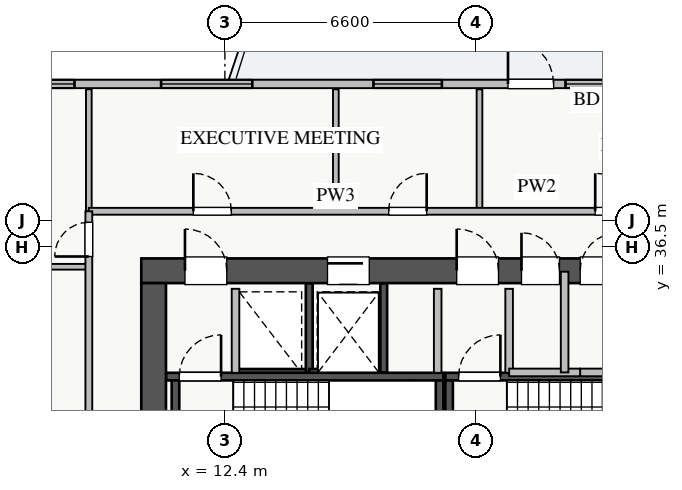
"""IFC4 building model, lengths in metres.
Left out: names, types, materials, properties, quantities, classifications, styles, units other than length and angle.
Written with IfcOpenShell. Run it as: python <this file> out.ifc"""

import sys

from ifc_helpers import new_model, si_unit, direction, frame, frame_2d, origin, place, context, subcontext, project, spatial, rectangle, extrude, source, transform, mapped, element, fill, save


model = new_model("IFC4")
c1 = context("Model", 3, precision=1e-05, world=origin(), true_north=direction((0.0, 1.0)))
c2 = subcontext(c1, "Body", "Model", "MODEL_VIEW")
j1 = project(units=[si_unit("LENGTHUNIT", "METRE"), si_unit("PLANEANGLEUNIT", "RADIAN")], contexts=[c1])
p1 = place(None, origin())
s1 = spatial("IfcSite", under=j1, at=p1, CompositionType="ELEMENT")
p2 = place(p1, origin())
s2 = spatial("IfcBuilding", under=s1, at=p2, CompositionType="ELEMENT")
p3 = place(p2, frame((0.0, 0.0, 103.5)))
s3 = spatial("IfcBuildingStorey", under=s2, at=p3, CompositionType="ELEMENT", Elevation=103.5)
p4 = place(p3, frame((12.68, 33.2, 0.0), z_axis=(0.0, 0.0, 1.0), x_axis=(1.0, 0.0, 0.0)))
e1 = element("IfcWall", 1, at=p4, inside=s3, PredefinedType="SHEAR", context=c2, shape_type="SweptSolid", body=[
    extrude(rectangle(XDim=1.94, YDim=0.18, at=frame_2d((0.97, 0.0))), origin(), (0.0, 0.0, 1.0), 3.07),
])
p5 = place(p3, frame((14.62, 33.2, 0.0), z_axis=(0.0, 0.0, 1.0), x_axis=(0.0, 1.0, 0.0)))
e2 = element("IfcWall", 2, at=p5, inside=s3, PredefinedType="SHEAR", context=c2, shape_type="SweptSolid", body=[
    extrude(rectangle(XDim=2.35, YDim=0.18, at=frame_2d((1.175, 0.0))), origin(), (0.0, 0.0, 1.0), 3.07),
])
p6 = place(p3, frame((14.62, 33.2, 0.0), z_axis=(0.0, 0.0, 1.0), x_axis=(1.0, 0.0, 0.0)))
e3 = element("IfcWall", 3, at=p6, inside=s3, PredefinedType="SHEAR", context=c2, shape_type="SweptSolid", body=[
    extrude(rectangle(XDim=1.96, YDim=0.18, at=frame_2d((0.98, 0.0))), origin(), (0.0, 0.0, 1.0), 3.07),
])
p7 = place(p3, frame((16.58, 33.2, 0.0), z_axis=(0.0, 0.0, 1.0), x_axis=(0.0, 1.0, 0.0)))
e4 = element("IfcWall", 4, at=p7, inside=s3, PredefinedType="SHEAR", context=c2, shape_type="SweptSolid", body=[
    extrude(rectangle(XDim=2.35, YDim=0.18, at=frame_2d((1.175, 0.0))), origin(), (0.0, 0.0, 1.0), 3.07),
])
p8 = place(p3, frame((10.85, 33.09, 0.0), z_axis=(0.0, 0.0, 1.0), x_axis=(1.0, 0.0, 0.0)))
e5 = element("IfcWall", 5, at=p8, inside=s3, PredefinedType="SHEAR", context=c2, shape_type="SweptSolid", body=[
    extrude(rectangle(XDim=7.3, YDim=0.2, at=frame_2d((3.65, 0.0))), origin(), (0.0, 0.0, 1.0), 3.25),
])
p9 = place(p8, frame((0.35, 0.0, 0.0)))
e6 = element("IfcOpeningElement", 6, at=p9, cuts=e5, PredefinedType="OPENING", context=c2, shape_type="SweptSolid", body=[
    extrude(rectangle(XDim=1.1, YDim=2.05, at=frame_2d((0.55, 1.025))), frame((0.0, 0.11, 0.0), z_axis=(0.0, -1.0, 0.0), x_axis=(1.0, 0.0, 0.0)), (0.0, 0.0, 1.0), 0.22),
])
for number, where, z_axis, x_axis in (
    (7, (11.1, 30.05, 0.0), (0.0, 0.0, 1.0), (0.0, 1.0, 0.0)),
    (8, (18.05, 30.05, 0.0), (0.0, 0.0, 1.0), (0.0, 1.0, 0.0)),
):
    element("IfcWall", number, at=place(p3, frame(where, z_axis=z_axis, x_axis=x_axis)), inside=s3, PredefinedType="SHEAR", context=c2, shape_type="SweptSolid", body=[
        extrude(rectangle(XDim=2.94, YDim=0.2, at=frame_2d((1.47, 0.0))), origin(), (0.0, 0.0, 1.0), 3.25),
    ])
p10 = place(p3, frame((18.2, 33.09, 0.0), z_axis=(0.0, 0.0, 1.0), x_axis=(1.0, 0.0, 0.0)))
e9 = element("IfcWall", 9, at=p10, inside=s3, PredefinedType="SHEAR", context=c2, shape_type="SweptSolid", body=[
    extrude(rectangle(XDim=7.15, YDim=0.2, at=frame_2d((3.575, 0.0))), origin(), (0.0, 0.0, 1.0), 3.25),
])
p11 = place(p10, frame((0.35, 0.0, 0.0)))
e10 = element("IfcOpeningElement", 10, at=p11, cuts=e9, PredefinedType="OPENING", context=c2, shape_type="SweptSolid", body=[
    extrude(rectangle(XDim=1.1, YDim=2.05, at=frame_2d((0.55, 1.025))), frame((0.0, 0.11, 0.0), z_axis=(0.0, -1.0, 0.0), x_axis=(1.0, 0.0, 0.0)), (0.0, 0.0, 1.0), 0.22),
])
p12 = place(p3, frame((18.3, 30.05, 0.0), z_axis=(0.0, 0.0, 1.0), x_axis=(0.0, 1.0, 0.0)))
e11 = element("IfcWall", 11, at=p12, inside=s3, PredefinedType="SHEAR", context=c2, shape_type="SweptSolid", body=[
    extrude(rectangle(XDim=2.94, YDim=0.2, at=frame_2d((1.47, 0.0))), origin(), (0.0, 0.0, 1.0), 3.25),
])
p13 = place(p3, frame((10.2, 35.875, 0.0), z_axis=(0.0, 0.0, 1.0), x_axis=(1.0, 0.0, 0.0)))
e12 = element("IfcWall", 12, at=p13, inside=s3, PredefinedType="SHEAR", context=c2, shape_type="SweptSolid", body=[
    extrude(rectangle(XDim=17.6, YDim=0.65, at=frame_2d((8.8, 0.0))), origin(), (0.0, 0.0, 1.0), 3.25),
])
p14 = place(p13, frame((1.15, 0.0, 0.0)))
e13 = element("IfcOpeningElement", 13, at=p14, cuts=e12, PredefinedType="OPENING", context=c2, shape_type="SweptSolid", body=[
    extrude(rectangle(XDim=1.1, YDim=2.05, at=frame_2d((0.55, 1.025))), frame((0.0, 0.335, 0.0), z_axis=(0.0, -1.0, 0.0), x_axis=(1.0, 0.0, 0.0)), (0.0, 0.0, 1.0), 0.67),
])
p15 = place(p13, frame((8.3, 0.0, 0.0)))
e14 = element("IfcOpeningElement", 14, at=p15, cuts=e12, PredefinedType="OPENING", context=c2, shape_type="SweptSolid", body=[
    extrude(rectangle(XDim=1.1, YDim=2.05, at=frame_2d((0.55, 1.025))), frame((0.0, 0.335, 0.0), z_axis=(0.0, -1.0, 0.0), x_axis=(1.0, 0.0, 0.0)), (0.0, 0.0, 1.0), 0.67),
])
p16 = place(p13, frame((4.9, 0.0, 0.0)))
e15 = element("IfcOpeningElement", 15, at=p16, cuts=e12, PredefinedType="OPENING", context=c2, shape_type="SweptSolid", body=[
    extrude(rectangle(XDim=1.1, YDim=2.05, at=frame_2d((0.55, 1.025))), frame((0.0, 0.335, 0.0), z_axis=(0.0, -1.0, 0.0), x_axis=(1.0, 0.0, 0.0)), (0.0, 0.0, 1.0), 0.67),
])
p17 = place(p13, frame((14.74, 0.0, 0.0)))
e16 = element("IfcOpeningElement", 16, at=p17, cuts=e12, PredefinedType="OPENING", context=c2, shape_type="SweptSolid", body=[
    extrude(rectangle(XDim=1.0, YDim=2.05, at=frame_2d((0.5, 1.025))), frame((0.0, 0.335, 0.0), z_axis=(0.0, -1.0, 0.0), x_axis=(1.0, 0.0, 0.0)), (0.0, 0.0, 1.0), 0.67),
])
p18 = place(p13, frame((10.005, 0.0, 0.0)))
e17 = element("IfcOpeningElement", 17, at=p18, cuts=e12, PredefinedType="OPENING", context=c2, shape_type="SweptSolid", body=[
    extrude(rectangle(XDim=1.0, YDim=2.05, at=frame_2d((0.5, 1.025))), frame((0.0, 0.335, 0.0), z_axis=(0.0, -1.0, 0.0), x_axis=(1.0, 0.0, 0.0)), (0.0, 0.0, 1.0), 0.67),
])
p19 = place(p13, frame((11.55, 0.0, 0.0)))
e18 = element("IfcOpeningElement", 18, at=p19, cuts=e12, PredefinedType="OPENING", context=c2, shape_type="SweptSolid", body=[
    extrude(rectangle(XDim=1.0, YDim=2.05, at=frame_2d((0.5, 1.025))), frame((0.0, 0.335, 0.0), z_axis=(0.0, -1.0, 0.0), x_axis=(1.0, 0.0, 0.0)), (0.0, 0.0, 1.0), 0.67),
])
p20 = place(p13, frame((13.215, 0.0, 0.0)))
e19 = element("IfcOpeningElement", 19, at=p20, cuts=e12, PredefinedType="OPENING", context=c2, shape_type="SweptSolid", body=[
    extrude(rectangle(XDim=1.0, YDim=2.05, at=frame_2d((0.5, 1.025))), frame((0.0, 0.335, 0.0), z_axis=(0.0, -1.0, 0.0), x_axis=(1.0, 0.0, 0.0)), (0.0, 0.0, 1.0), 0.67),
])
p21 = place(p3, frame((10.525, 29.65, 0.0), z_axis=(0.0, 0.0, 1.0), x_axis=(0.0, 1.0, 0.0)))
e20 = element("IfcWall", 20, at=p21, inside=s3, PredefinedType="SHEAR", context=c2, shape_type="SweptSolid", body=[
    extrude(rectangle(XDim=5.9, YDim=0.65, at=frame_2d((2.95, 0.0))), origin(), (0.0, 0.0, 1.0), 3.25),
])
p22 = place(p3, frame((6.55, 40.79, 0.0), z_axis=(0.0, 0.0, 1.0), x_axis=(1.0, 0.0, 0.0)))
e21 = element("IfcWall", 21, at=p22, inside=s3, PredefinedType="STANDARD", context=c2, shape_type="SweptSolid", body=[
    extrude(rectangle(XDim=24.9, YDim=0.22, at=frame_2d((12.45, 0.0))), origin(), (0.0, 0.0, 1.0), 2.61),
])
p23 = place(p22, frame((13.3, 0.0, 0.0)))
e22 = element("IfcOpeningElement", 22, at=p23, cuts=e21, PredefinedType="OPENING", context=c2, shape_type="SweptSolid", body=[
    extrude(rectangle(XDim=1.2, YDim=2.1, at=frame_2d((0.6, 1.05))), frame((0.0, 0.12, 0.0), z_axis=(0.0, -1.0, 0.0), x_axis=(1.0, 0.0, 0.0)), (0.0, 0.0, 1.0), 0.24),
])
p24 = place(p22, frame((0.393, 0.0, 0.9)))
e23 = element("IfcOpeningElement", 23, at=p24, cuts=e21, PredefinedType="OPENING", context=c2, shape_type="SweptSolid", body=[
    extrude(rectangle(XDim=1.5, YDim=1.5, at=frame_2d((0.75, 0.75))), frame((0.0, 0.12, 0.0), z_axis=(0.0, -1.0, 0.0), x_axis=(1.0, 0.0, 0.0)), (0.0, 0.0, 1.0), 0.24),
])
p25 = place(p22, frame((9.76, 0.0, 0.9)))
e24 = element("IfcOpeningElement", 24, at=p25, cuts=e21, PredefinedType="OPENING", context=c2, shape_type="SweptSolid", body=[
    extrude(rectangle(XDim=1.8, YDim=1.5, at=frame_2d((0.9, 0.75))), frame((0.0, 0.12, 0.0), z_axis=(0.0, -1.0, 0.0), x_axis=(1.0, 0.0, 0.0)), (0.0, 0.0, 1.0), 0.24),
])
p26 = place(p22, frame((14.813, 0.0, 0.9)))
e25 = element("IfcOpeningElement", 25, at=p26, cuts=e21, PredefinedType="OPENING", context=c2, shape_type="SweptSolid", body=[
    extrude(rectangle(XDim=1.5, YDim=1.45, at=frame_2d((0.75, 0.725))), frame((0.0, 0.12, 0.0), z_axis=(0.0, -1.0, 0.0), x_axis=(1.0, 0.0, 0.0)), (0.0, 0.0, 1.0), 0.24),
])
p27 = place(p22, frame((20.738, 0.0, 0.9)))
e26 = element("IfcOpeningElement", 26, at=p27, cuts=e21, PredefinedType="OPENING", context=c2, shape_type="SweptSolid", body=[
    extrude(rectangle(XDim=2.1, YDim=1.48, at=frame_2d((1.05, 0.74))), frame((0.0, 0.12, 0.0), z_axis=(0.0, -1.0, 0.0), x_axis=(1.0, 0.0, 0.0)), (0.0, 0.0, 1.0), 0.24),
])
p28 = place(p22, frame((4.171, 0.0, 0.9)))
e27 = element("IfcOpeningElement", 27, at=p28, cuts=e21, PredefinedType="OPENING", context=c2, shape_type="SweptSolid", body=[
    extrude(rectangle(XDim=2.4, YDim=1.5, at=frame_2d((1.2, 0.75))), frame((0.0, 0.12, 0.0), z_axis=(0.0, -1.0, 0.0), x_axis=(1.0, 0.0, 0.0)), (0.0, 0.0, 1.0), 0.24),
])
for number, where, z_axis, x_axis in (
    (28, (12.68, 33.19, 0.0), (0.0, 0.0, 1.0), (0.0, 1.0, 0.0)),
    (29, (18.0, 33.19, 0.0), (0.0, 0.0, 1.0), (0.0, 1.0, 0.0)),
    (30, (19.88, 33.19, 0.0), (0.0, 0.0, 1.0), (0.0, 1.0, 0.0)),
):
    element("IfcWall", number, at=place(p3, frame(where, z_axis=z_axis, x_axis=x_axis)), inside=s3, PredefinedType="PARTITIONING", context=c2, shape_type="SweptSolid", body=[
        extrude(rectangle(XDim=2.21, YDim=0.2, at=frame_2d((1.105, 0.0))), origin(), (0.0, 0.0, 1.0), 3.07),
    ])
p29 = place(p3, frame((19.88, 33.2, 0.0), z_axis=(0.0, 0.0, 1.0), x_axis=(1.0, 0.0, 0.0)))
e31 = element("IfcWall", 31, at=p29, inside=s3, PredefinedType="PARTITIONING", context=c2, shape_type="SweptSolid", body=[
    extrude(rectangle(XDim=1.87, YDim=0.2, at=frame_2d((0.935, 0.0))), origin(), (0.0, 0.0, 1.0), 3.07),
])
p30 = place(p3, frame((21.34, 33.2, 0.0), z_axis=(0.0, 0.0, 1.0), x_axis=(0.0, 1.0, 0.0)))
e32 = element("IfcWall", 32, at=p30, inside=s3, PredefinedType="PARTITIONING", context=c2, shape_type="SweptSolid", body=[
    extrude(rectangle(XDim=2.65, YDim=0.2, at=frame_2d((1.325, 0.0))), origin(), (0.0, 0.0, 1.0), 3.07),
])
p31 = place(p3, frame((21.75, 33.2, 0.0), z_axis=(0.0, 0.0, 1.0), x_axis=(1.0, 0.0, 0.0)))
e33 = element("IfcWall", 33, at=p31, inside=s3, PredefinedType="PARTITIONING", context=c2, shape_type="SweptSolid", body=[
    extrude(rectangle(XDim=5.17, YDim=0.2, at=frame_2d((2.585, 0.0))), origin(), (0.0, 0.0, 1.0), 3.07),
])
p32 = place(p3, frame((15.32, 37.44, 0.0), z_axis=(0.0, 0.0, 1.0), x_axis=(0.0, 1.0, 0.0)))
e34 = element("IfcWall", 34, at=p32, inside=s3, PredefinedType="PARTITIONING", context=c2, shape_type="SweptSolid", body=[
    extrude(rectangle(XDim=3.21, YDim=0.15, at=frame_2d((1.605, 0.0))), origin(), (0.0, 0.0, 1.0), 3.07),
])
p33 = place(p3, frame((19.1, 37.44, 0.0), z_axis=(0.0, 0.0, 1.0), x_axis=(0.0, 1.0, 0.0)))
e35 = element("IfcWall", 35, at=p33, inside=s3, PredefinedType="PARTITIONING", context=c2, shape_type="SweptSolid", body=[
    extrude(rectangle(XDim=3.21, YDim=0.15, at=frame_2d((1.605, 0.0))), origin(), (0.0, 0.0, 1.0), 2.865),
])
p34 = place(p3, frame((8.82, 37.44, 0.0), z_axis=(0.0, 0.0, 1.0), x_axis=(0.0, 1.0, 0.0)))
e36 = element("IfcWall", 36, at=p34, inside=s3, PredefinedType="PARTITIONING", context=c2, shape_type="SweptSolid", body=[
    extrude(rectangle(XDim=3.21, YDim=0.15, at=frame_2d((1.605, 0.0))), origin(), (0.0, 0.0, 1.0), 3.07),
])
p35 = place(p3, frame((8.82, 37.44, 0.0), z_axis=(0.0, 0.0, 1.0), x_axis=(1.0, 0.0, 0.0)))
e37 = element("IfcWall", 37, at=p35, inside=s3, PredefinedType="PARTITIONING", context=c2, shape_type="SweptSolid", body=[
    extrude(rectangle(XDim=23.58, YDim=0.18, at=frame_2d((11.79, 0.0))), origin(), (0.0, 0.0, 1.0), 3.07),
])
p36 = place(p35, frame((2.75, 0.0, 0.0)))
e38 = element("IfcOpeningElement", 38, at=p36, cuts=e37, PredefinedType="OPENING", context=c2, shape_type="SweptSolid", body=[
    extrude(rectangle(XDim=1.0, YDim=2.05, at=frame_2d((0.5, 1.025))), frame((0.0, 0.1, 0.0), z_axis=(0.0, -1.0, 0.0), x_axis=(1.0, 0.0, 0.0)), (0.0, 0.0, 1.0), 0.2),
])
p37 = place(p35, frame((7.89, 0.0, 0.0)))
e39 = element("IfcOpeningElement", 39, at=p37, cuts=e37, PredefinedType="OPENING", context=c2, shape_type="SweptSolid", body=[
    extrude(rectangle(XDim=1.0, YDim=2.05, at=frame_2d((0.5, 1.025))), frame((0.0, 0.1, 0.0), z_axis=(0.0, -1.0, 0.0), x_axis=(1.0, 0.0, 0.0)), (0.0, 0.0, 1.0), 0.2),
])
p38 = place(p35, frame((13.325, 0.0, 0.0)))
e40 = element("IfcOpeningElement", 40, at=p38, cuts=e37, PredefinedType="OPENING", context=c2, shape_type="SweptSolid", body=[
    extrude(rectangle(XDim=1.0, YDim=2.05, at=frame_2d((0.5, 1.025))), frame((0.0, 0.1, 0.0), z_axis=(0.0, -1.0, 0.0), x_axis=(1.0, 0.0, 0.0)), (0.0, 0.0, 1.0), 0.2),
])
p39 = place(p35, frame((19.765, 0.0, 0.0)))
e41 = element("IfcOpeningElement", 41, at=p39, cuts=e37, PredefinedType="OPENING", context=c2, shape_type="SweptSolid", body=[
    extrude(rectangle(XDim=1.0, YDim=2.05, at=frame_2d((0.5, 1.025))), frame((0.0, 0.1, 0.0), z_axis=(0.0, -1.0, 0.0), x_axis=(1.0, 0.0, 0.0)), (0.0, 0.0, 1.0), 0.2),
])
p40 = place(p3, frame((1.35, 35.98, 0.0), z_axis=(0.0, 0.0, 1.0), x_axis=(1.0, 0.0, 0.0)))
e42 = element("IfcWall", 42, at=p40, inside=s3, PredefinedType="PARTITIONING", context=c2, shape_type="SweptSolid", body=[
    extrude(rectangle(XDim=7.47, YDim=0.15, at=frame_2d((3.735, 0.0))), origin(), (0.0, 0.0, 1.0), 3.07),
])
p41 = place(p3, frame((8.82, 8.31, 0.0), z_axis=(0.0, 0.0, 1.0), x_axis=(0.0, 1.0, 0.0)))
e43 = element("IfcWall", 43, at=p41, inside=s3, PredefinedType="PARTITIONING", context=c2, shape_type="SweptSolid", body=[
    extrude(rectangle(XDim=29.13, YDim=0.18, at=frame_2d((14.565, 0.0))), origin(), (0.0, 0.0, 1.0), 3.07),
])
p42 = place(p41, frame((27.94, 0.0, 0.0)))
e44 = element("IfcOpeningElement", 44, at=p42, cuts=e43, PredefinedType="OPENING", context=c2, shape_type="SweptSolid", body=[
    extrude(rectangle(XDim=0.9, YDim=2.05, at=frame_2d((0.45, 1.025))), frame((0.0, 0.1, 0.0), z_axis=(0.0, -1.0, 0.0), x_axis=(1.0, 0.0, 0.0)), (0.0, 0.0, 1.0), 0.2),
])
p43 = place(p41, frame((0.24, 0.0, 0.0)))
e45 = element("IfcOpeningElement", 45, at=p43, cuts=e43, PredefinedType="OPENING", context=c2, shape_type="SweptSolid", body=[
    extrude(rectangle(XDim=0.9, YDim=2.05, at=frame_2d((0.45, 1.025))), frame((0.0, 0.1, 0.0), z_axis=(0.0, -1.0, 0.0), x_axis=(1.0, 0.0, 0.0)), (0.0, 0.0, 1.0), 0.2),
])
p44 = place(p41, frame((3.69, 0.0, 0.0)))
e46 = element("IfcOpeningElement", 46, at=p44, cuts=e43, PredefinedType="OPENING", context=c2, shape_type="SweptSolid", body=[
    extrude(rectangle(XDim=1.0, YDim=2.05, at=frame_2d((0.5, 1.025))), frame((0.0, 0.1, 0.0), z_axis=(0.0, -1.0, 0.0), x_axis=(1.0, 0.0, 0.0)), (0.0, 0.0, 1.0), 0.2),
])
p45 = place(p41, frame((20.305, 0.0, 0.0)))
e47 = element("IfcOpeningElement", 47, at=p45, cuts=e43, PredefinedType="OPENING", context=c2, shape_type="SweptSolid", body=[
    extrude(rectangle(XDim=1.0, YDim=2.05, at=frame_2d((0.5, 1.025))), frame((0.0, 0.1, 0.0), z_axis=(0.0, -1.0, 0.0), x_axis=(1.0, 0.0, 0.0)), (0.0, 0.0, 1.0), 0.2),
])
m1 = source(origin(), c2, "Body", "SweptSolid", [
    extrude(rectangle(XDim=1.2, YDim=2.1, at=frame_2d((0.6, 1.05))), frame((0.0, 0.025, 0.0), z_axis=(0.0, -1.0, 0.0), x_axis=(1.0, 0.0, 0.0)), (0.0, 0.0, 1.0), 0.05),
])
p46 = place(p23, origin())
e48 = element("IfcDoor", 48, at=p46, inside=s3, OperationType="SINGLE_SWING_LEFT", PredefinedType="DOOR", context=c2, shape_type="MappedRepresentation", body=[
    mapped(m1, transform((0.0, 0.0, 0.0), x_axis=(1.0, 0.0, 0.0), y_axis=(0.0, 1.0, 0.0), z_axis=(0.0, 0.0, 1.0), scale=1.0)),
])
fill(e22, e48)
m2 = source(origin(), c2, "Body", "SweptSolid", [
    extrude(rectangle(XDim=1.5, YDim=1.5, at=frame_2d((0.75, 0.75))), frame((0.0, 0.03, 0.0), z_axis=(0.0, -1.0, 0.0), x_axis=(1.0, 0.0, 0.0)), (0.0, 0.0, 1.0), 0.06),
])
p47 = place(p24, origin())
e49 = element("IfcWindow", 49, at=p47, inside=s3, PartitioningType="TRIPLE_PANEL_VERTICAL", PredefinedType="WINDOW", context=c2, shape_type="MappedRepresentation", body=[
    mapped(m2, transform((0.0, 0.0, 0.0), x_axis=(1.0, 0.0, 0.0), y_axis=(0.0, 1.0, 0.0), z_axis=(0.0, 0.0, 1.0), scale=1.0)),
])
fill(e23, e49)
m3 = source(origin(), c2, "Body", "SweptSolid", [
    extrude(rectangle(XDim=1.8, YDim=1.5, at=frame_2d((0.9, 0.75))), frame((0.0, 0.03, 0.0), z_axis=(0.0, -1.0, 0.0), x_axis=(1.0, 0.0, 0.0)), (0.0, 0.0, 1.0), 0.06),
])
p48 = place(p25, origin())
e50 = element("IfcWindow", 50, at=p48, inside=s3, PartitioningType="DOUBLE_PANEL_VERTICAL", PredefinedType="WINDOW", context=c2, shape_type="MappedRepresentation", body=[
    mapped(m3, transform((0.0, 0.0, 0.0), x_axis=(1.0, 0.0, 0.0), y_axis=(0.0, 1.0, 0.0), z_axis=(0.0, 0.0, 1.0), scale=1.0)),
])
fill(e24, e50)
m4 = source(origin(), c2, "Body", "SweptSolid", [
    extrude(rectangle(XDim=1.5, YDim=1.45, at=frame_2d((0.75, 0.725))), frame((0.0, 0.03, 0.0), z_axis=(0.0, -1.0, 0.0), x_axis=(1.0, 0.0, 0.0)), (0.0, 0.0, 1.0), 0.06),
])
p49 = place(p26, origin())
e51 = element("IfcWindow", 51, at=p49, inside=s3, PartitioningType="DOUBLE_PANEL_VERTICAL", PredefinedType="WINDOW", context=c2, shape_type="MappedRepresentation", body=[
    mapped(m4, transform((0.0, 0.0, 0.0), x_axis=(1.0, 0.0, 0.0), y_axis=(0.0, 1.0, 0.0), z_axis=(0.0, 0.0, 1.0), scale=1.0)),
])
fill(e25, e51)
m5 = source(origin(), c2, "Body", "SweptSolid", [
    extrude(rectangle(XDim=1.1, YDim=2.05, at=frame_2d((0.55, 1.025))), frame((0.0, 0.025, 0.0), z_axis=(0.0, -1.0, 0.0), x_axis=(1.0, 0.0, 0.0)), (0.0, 0.0, 1.0), 0.05),
])
p50 = place(p14, origin())
e52 = element("IfcDoor", 52, at=p50, inside=s3, OperationType="SINGLE_SWING_LEFT", PredefinedType="DOOR", context=c2, shape_type="MappedRepresentation", body=[
    mapped(m5, transform((0.0, 0.0, 0.0), x_axis=(1.0, 0.0, 0.0), y_axis=(0.0, 1.0, 0.0), z_axis=(0.0, 0.0, 1.0), scale=1.0)),
])
fill(e13, e52)
p51 = place(p9, origin())
e53 = element("IfcDoor", 53, at=p51, inside=s3, OperationType="SINGLE_SWING_RIGHT", PredefinedType="DOOR", context=c2, shape_type="MappedRepresentation", body=[
    mapped(m5, transform((0.0, 0.0, 0.0), x_axis=(1.0, 0.0, 0.0), y_axis=(0.0, 1.0, 0.0), z_axis=(0.0, 0.0, 1.0), scale=1.0)),
])
fill(e6, e53)
p52 = place(p15, origin())
e54 = element("IfcDoor", 54, at=p52, inside=s3, OperationType="SINGLE_SWING_LEFT", PredefinedType="DOOR", context=c2, shape_type="MappedRepresentation", body=[
    mapped(m5, transform((0.0, 0.0, 0.0), x_axis=(1.0, 0.0, 0.0), y_axis=(0.0, 1.0, 0.0), z_axis=(0.0, 0.0, 1.0), scale=1.0)),
])
fill(e14, e54)
p53 = place(p11, origin())
e55 = element("IfcDoor", 55, at=p53, inside=s3, OperationType="SINGLE_SWING_RIGHT", PredefinedType="DOOR", context=c2, shape_type="MappedRepresentation", body=[
    mapped(m5, transform((0.0, 0.0, 0.0), x_axis=(1.0, 0.0, 0.0), y_axis=(0.0, 1.0, 0.0), z_axis=(0.0, 0.0, 1.0), scale=1.0)),
])
fill(e10, e55)
p54 = place(p16, origin())
e56 = element("IfcDoor", 56, at=p54, inside=s3, OperationType="SLIDING_TO_LEFT", PredefinedType="DOOR", context=c2, shape_type="MappedRepresentation", body=[
    mapped(m5, transform((0.0, 0.0, 0.0), x_axis=(1.0, 0.0, 0.0), y_axis=(0.0, 1.0, 0.0), z_axis=(0.0, 0.0, 1.0), scale=1.0)),
])
fill(e15, e56)
m6 = source(origin(), c2, "Body", "SweptSolid", [
    extrude(rectangle(XDim=1.0, YDim=2.05, at=frame_2d((0.5, 1.025))), frame((0.0, 0.025, 0.0), z_axis=(0.0, -1.0, 0.0), x_axis=(1.0, 0.0, 0.0)), (0.0, 0.0, 1.0), 0.05),
])
p55 = place(p18, origin())
e57 = element("IfcDoor", 57, at=p55, inside=s3, OperationType="SINGLE_SWING_LEFT", PredefinedType="DOOR", context=c2, shape_type="MappedRepresentation", body=[
    mapped(m6, transform((0.0, 0.0, 0.0), x_axis=(1.0, 0.0, 0.0), y_axis=(0.0, 1.0, 0.0), z_axis=(0.0, 0.0, 1.0), scale=1.0)),
])
fill(e17, e57)
p56 = place(p19, origin())
e58 = element("IfcDoor", 58, at=p56, inside=s3, OperationType="SINGLE_SWING_RIGHT", PredefinedType="DOOR", context=c2, shape_type="MappedRepresentation", body=[
    mapped(m6, transform((0.0, 0.0, 0.0), x_axis=(1.0, 0.0, 0.0), y_axis=(0.0, 1.0, 0.0), z_axis=(0.0, 0.0, 1.0), scale=1.0)),
])
fill(e18, e58)
p57 = place(p36, origin())
e59 = element("IfcDoor", 59, at=p57, inside=s3, OperationType="SINGLE_SWING_LEFT", PredefinedType="DOOR", context=c2, shape_type="MappedRepresentation", body=[
    mapped(m6, transform((0.0, 0.0, 0.0), x_axis=(1.0, 0.0, 0.0), y_axis=(0.0, 1.0, 0.0), z_axis=(0.0, 0.0, 1.0), scale=1.0)),
])
fill(e38, e59)
p58 = place(p37, origin())
e60 = element("IfcDoor", 60, at=p58, inside=s3, OperationType="SINGLE_SWING_RIGHT", PredefinedType="DOOR", context=c2, shape_type="MappedRepresentation", body=[
    mapped(m6, transform((0.0, 0.0, 0.0), x_axis=(1.0, 0.0, 0.0), y_axis=(0.0, 1.0, 0.0), z_axis=(0.0, 0.0, 1.0), scale=1.0)),
])
fill(e39, e60)
p59 = place(p38, origin())
e61 = element("IfcDoor", 61, at=p59, inside=s3, OperationType="SINGLE_SWING_LEFT", PredefinedType="DOOR", context=c2, shape_type="MappedRepresentation", body=[
    mapped(m6, transform((0.0, 0.0, 0.0), x_axis=(1.0, 0.0, 0.0), y_axis=(0.0, 1.0, 0.0), z_axis=(0.0, 0.0, 1.0), scale=1.0)),
])
fill(e40, e61)
m7 = source(origin(), c2, "Body", "SweptSolid", [
    extrude(rectangle(XDim=0.9, YDim=2.05, at=frame_2d((0.45, 1.025))), frame((0.0, 0.025, 0.0), z_axis=(0.0, -1.0, 0.0), x_axis=(1.0, 0.0, 0.0)), (0.0, 0.0, 1.0), 0.05),
])
p60 = place(p42, origin())
e62 = element("IfcDoor", 62, at=p60, inside=s3, OperationType="SINGLE_SWING_LEFT", PredefinedType="DOOR", context=c2, shape_type="MappedRepresentation", body=[
    mapped(m7, transform((0.0, 0.0, 0.0), x_axis=(1.0, 0.0, 0.0), y_axis=(0.0, 1.0, 0.0), z_axis=(0.0, 0.0, 1.0), scale=1.0)),
])
fill(e44, e62)
m8 = source(origin(), c2, "Body", "SweptSolid", [
    extrude(rectangle(XDim=2.4, YDim=1.5, at=frame_2d((1.2, 0.75))), frame((0.0, 0.03, 0.0), z_axis=(0.0, -1.0, 0.0), x_axis=(1.0, 0.0, 0.0)), (0.0, 0.0, 1.0), 0.06),
])
p61 = place(p28, origin())
e63 = element("IfcWindow", 63, at=p61, inside=s3, PartitioningType="TRIPLE_PANEL_VERTICAL", PredefinedType="WINDOW", context=c2, shape_type="MappedRepresentation", body=[
    mapped(m8, transform((0.0, 0.0, 0.0), x_axis=(1.0, 0.0, 0.0), y_axis=(0.0, 1.0, 0.0), z_axis=(0.0, 0.0, 1.0), scale=1.0)),
])
fill(e27, e63)
save(model, sys.argv[1])
